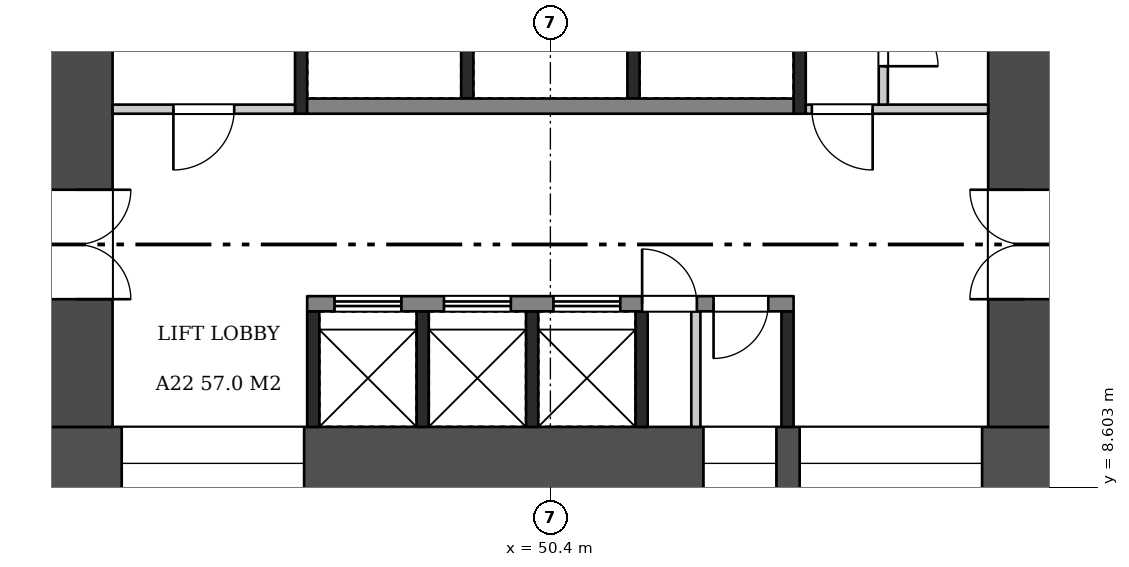
"""IFC4 building model, lengths in metres.
Left out: names, types, materials, properties, quantities, classifications, styles, units other than length and angle.
Written with IfcOpenShell. Run it as: python <this file> out.ifc"""

import sys

from ifc_helpers import new_model, si_unit, direction, frame, frame_2d, origin, place, context, subcontext, project, spatial, rectangle, extrude, element, fill, save


model = new_model("IFC4")
c1 = context("Model", 3, precision=1e-05, world=origin(), true_north=direction((0.0, 1.0)))
c2 = subcontext(c1, "Body", "Model", "MODEL_VIEW")
j1 = project(units=[si_unit("LENGTHUNIT", "METRE"), si_unit("PLANEANGLEUNIT", "RADIAN")], contexts=[c1])
p1 = place(None, origin())
s1 = spatial("IfcSite", under=j1, at=p1, CompositionType="ELEMENT")
p2 = place(p1, origin())
s2 = spatial("IfcBuilding", under=s1, at=p2, CompositionType="ELEMENT")
p3 = place(p2, frame((0.0, 0.0, 91.7)))
s3 = spatial("IfcBuildingStorey", under=s2, at=p3, CompositionType="ELEMENT", Elevation=91.7)
p4 = place(p3, frame((42.0, 9.0, 0.0), z_axis=(0.0, 0.0, 1.0), x_axis=(1.0, 0.0, 0.0)))
e1 = element("IfcWall", 1, at=p4, inside=s3, PredefinedType="SHEAR", context=c2, shape_type="SweptSolid", body=[
    extrude(rectangle(XDim=16.8, YDim=1.2, at=frame_2d((8.4, 0.0))), origin(), (0.0, 0.0, 1.0), 3.22),
])
p5 = place(p4, frame((1.35, 0.0, 0.6)))
e2 = element("IfcOpeningElement", 2, at=p5, cuts=e1, PredefinedType="OPENING", context=c2, shape_type="SweptSolid", body=[
    extrude(rectangle(XDim=3.0, YDim=2.1, at=frame_2d((1.5, 1.05))), frame((0.0, 0.61, 0.0), z_axis=(0.0, -1.0, 0.0), x_axis=(1.0, 0.0, 0.0)), (0.0, 0.0, 1.0), 1.22),
])
p6 = place(p4, frame((10.917, 0.0, 1.6)))
e3 = element("IfcOpeningElement", 3, at=p6, cuts=e1, PredefinedType="OPENING", context=c2, shape_type="SweptSolid", body=[
    extrude(rectangle(XDim=1.2, YDim=1.2, at=frame_2d((0.6, 0.6))), frame((0.0, 0.61, 0.0), z_axis=(0.0, -1.0, 0.0), x_axis=(1.0, 0.0, 0.0)), (0.0, 0.0, 1.0), 1.22),
])
p7 = place(p4, frame((12.5, 0.0, 0.6)))
e4 = element("IfcOpeningElement", 4, at=p7, cuts=e1, PredefinedType="OPENING", context=c2, shape_type="SweptSolid", body=[
    extrude(rectangle(XDim=3.0, YDim=2.1, at=frame_2d((1.5, 1.05))), frame((0.0, 0.61, 0.0), z_axis=(0.0, -1.0, 0.0), x_axis=(1.0, 0.0, 0.0)), (0.0, 0.0, 1.0), 1.22),
])
p8 = place(p3, frame((42.6, 9.6, 0.0), z_axis=(0.0, 0.0, 1.0), x_axis=(0.0, 1.0, 0.0)))
e5 = element("IfcWall", 5, at=p8, inside=s3, PredefinedType="SHEAR", context=c2, shape_type="SweptSolid", body=[
    extrude(rectangle(XDim=14.4, YDim=1.2, at=frame_2d((7.2, 0.0))), origin(), (0.0, 0.0, 1.0), 3.22),
])
p9 = place(p8, frame((2.1, 0.0, 0.0)))
e6 = element("IfcOpeningElement", 6, at=p9, cuts=e5, PredefinedType="OPENING", context=c2, shape_type="SweptSolid", body=[
    extrude(rectangle(XDim=1.8, YDim=2.1, at=frame_2d((0.9, 1.05))), frame((0.0, 0.61, 0.0), z_axis=(0.0, -1.0, 0.0), x_axis=(1.0, 0.0, 0.0)), (0.0, 0.0, 1.0), 1.22),
])
p10 = place(p3, frame((58.2, 9.6, 0.0), z_axis=(0.0, 0.0, 1.0), x_axis=(0.0, 1.0, 0.0)))
e7 = element("IfcWall", 7, at=p10, inside=s3, PredefinedType="SHEAR", context=c2, shape_type="SweptSolid", body=[
    extrude(rectangle(XDim=14.4, YDim=1.2, at=frame_2d((7.2, 0.0))), origin(), (0.0, 0.0, 1.0), 3.22),
])
p11 = place(p10, frame((2.1, 0.0, 0.0)))
e8 = element("IfcOpeningElement", 8, at=p11, cuts=e7, PredefinedType="OPENING", context=c2, shape_type="SweptSolid", body=[
    extrude(rectangle(XDim=1.8, YDim=2.1, at=frame_2d((0.9, 1.05))), frame((0.0, 0.61, 0.0), z_axis=(0.0, -1.0, 0.0), x_axis=(1.0, 0.0, 0.0)), (0.0, 0.0, 1.0), 1.22),
])
for number, where, z_axis, x_axis in (
    (9, (46.5, 9.6, 0.0), (0.0, 0.0, 1.0), (0.0, 1.0, 0.0)),
    (10, (48.3, 9.6, 0.0), (0.0, 0.0, 1.0), (0.0, 1.0, 0.0)),
    (11, (50.1, 9.6, 0.0), (0.0, 0.0, 1.0), (0.0, 1.0, 0.0)),
    (12, (51.9, 9.6, 0.0), (0.0, 0.0, 1.0), (0.0, 1.0, 0.0)),
    (13, (54.3, 9.6, 0.0), (0.0, 0.0, 1.0), (0.0, 1.0, 0.0)),
):
    element("IfcWall", number, at=place(p3, frame(where, z_axis=z_axis, x_axis=x_axis)), inside=s3, PredefinedType="SHEAR", context=c2, shape_type="SweptSolid", body=[
        extrude(rectangle(XDim=1.9, YDim=0.2, at=frame_2d((0.95, 0.0))), origin(), (0.0, 0.0, 1.0), 3.22),
    ])
p12 = place(p3, frame((52.792, 9.6, 0.0), z_axis=(0.0, 0.0, 1.0), x_axis=(0.0, 1.0, 0.0)))
e14 = element("IfcWall", 14, at=p12, inside=s3, PredefinedType="PARTITIONING", context=c2, shape_type="SweptSolid", body=[
    extrude(rectangle(XDim=1.9, YDim=0.15, at=frame_2d((0.95, 0.0))), origin(), (0.0, 0.0, 1.0), 3.22),
])
p13 = place(p3, frame((46.4, 11.625, 0.0), z_axis=(0.0, 0.0, 1.0), x_axis=(1.0, 0.0, 0.0)))
e15 = element("IfcWall", 15, at=p13, inside=s3, PredefinedType="SHEAR", context=c2, shape_type="SweptSolid", body=[
    extrude(rectangle(XDim=8.0, YDim=0.25, at=frame_2d((4.0, 0.0))), origin(), (0.0, 0.0, 1.0), 3.22),
])
p14 = place(p13, frame((0.45, 0.0, 0.0)))
e16 = element("IfcOpeningElement", 16, at=p14, cuts=e15, PredefinedType="OPENING", context=c2, shape_type="SweptSolid", body=[
    extrude(rectangle(XDim=1.1, YDim=2.1, at=frame_2d((0.55, 1.05))), frame((0.0, 0.135, 0.0), z_axis=(0.0, -1.0, 0.0), x_axis=(1.0, 0.0, 0.0)), (0.0, 0.0, 1.0), 0.27),
])
p15 = place(p13, frame((2.25, 0.0, 0.0)))
e17 = element("IfcOpeningElement", 17, at=p15, cuts=e15, PredefinedType="OPENING", context=c2, shape_type="SweptSolid", body=[
    extrude(rectangle(XDim=1.1, YDim=2.1, at=frame_2d((0.55, 1.05))), frame((0.0, 0.135, 0.0), z_axis=(0.0, -1.0, 0.0), x_axis=(1.0, 0.0, 0.0)), (0.0, 0.0, 1.0), 0.27),
])
p16 = place(p13, frame((4.05, 0.0, 0.0)))
e18 = element("IfcOpeningElement", 18, at=p16, cuts=e15, PredefinedType="OPENING", context=c2, shape_type="SweptSolid", body=[
    extrude(rectangle(XDim=1.1, YDim=2.1, at=frame_2d((0.55, 1.05))), frame((0.0, 0.135, 0.0), z_axis=(0.0, -1.0, 0.0), x_axis=(1.0, 0.0, 0.0)), (0.0, 0.0, 1.0), 0.27),
])
p17 = place(p13, frame((5.509, 0.0, 0.0)))
e19 = element("IfcOpeningElement", 19, at=p17, cuts=e15, PredefinedType="OPENING", context=c2, shape_type="SweptSolid", body=[
    extrude(rectangle(XDim=0.9, YDim=2.1, at=frame_2d((0.45, 1.05))), frame((0.0, 0.135, 0.0), z_axis=(0.0, -1.0, 0.0), x_axis=(1.0, 0.0, 0.0)), (0.0, 0.0, 1.0), 0.27),
])
p18 = place(p13, frame((6.684, 0.0, 0.0)))
e20 = element("IfcOpeningElement", 20, at=p18, cuts=e15, PredefinedType="OPENING", context=c2, shape_type="SweptSolid", body=[
    extrude(rectangle(XDim=0.9, YDim=2.1, at=frame_2d((0.45, 1.05))), frame((0.0, 0.135, 0.0), z_axis=(0.0, -1.0, 0.0), x_axis=(1.0, 0.0, 0.0)), (0.0, 0.0, 1.0), 0.27),
])
for number, where, z_axis, x_axis in (
    (21, (49.033, 15.0, 0.0), (0.0, 0.0, 1.0), (0.0, 1.0, 0.0)),
    (22, (51.767, 15.0, 0.0), (0.0, 0.0, 1.0), (0.0, 1.0, 0.0)),
):
    element("IfcWall", number, at=place(p3, frame(where, z_axis=z_axis, x_axis=x_axis)), inside=s3, PredefinedType="SHEAR", context=c2, shape_type="SweptSolid", body=[
        extrude(rectangle(XDim=1.9, YDim=0.2, at=frame_2d((0.95, 0.0))), origin(), (0.0, 0.0, 1.0), 3.22),
    ])
p19 = place(p3, frame((46.4, 14.875, 0.0), z_axis=(0.0, 0.0, 1.0), x_axis=(1.0, 0.0, 0.0)))
e23 = element("IfcWall", 23, at=p19, inside=s3, PredefinedType="SHEAR", context=c2, shape_type="SweptSolid", body=[
    extrude(rectangle(XDim=8.0, YDim=0.25, at=frame_2d((4.0, 0.0))), origin(), (0.0, 0.0, 1.0), 3.22),
])
p20 = place(p3, frame((46.3, 14.75, 0.0), z_axis=(0.0, 0.0, 1.0), x_axis=(0.0, 1.0, 0.0)))
e24 = element("IfcWall", 24, at=p20, inside=s3, PredefinedType="SHEAR", context=c2, shape_type="SweptSolid", body=[
    extrude(rectangle(XDim=2.4, YDim=0.2, at=frame_2d((1.2, 0.0))), origin(), (0.0, 0.0, 1.0), 3.22),
])
p21 = place(p3, frame((43.2, 14.825, 0.0), z_axis=(0.0, 0.0, 1.0), x_axis=(1.0, 0.0, 0.0)))
e25 = element("IfcWall", 25, at=p21, inside=s3, PredefinedType="PARTITIONING", context=c2, shape_type="SweptSolid", body=[
    extrude(rectangle(XDim=3.0, YDim=0.15, at=frame_2d((1.5, 0.0))), origin(), (0.0, 0.0, 1.0), 3.22),
])
p22 = place(p21, frame((1.0, 0.0, 0.0)))
e26 = element("IfcOpeningElement", 26, at=p22, cuts=e25, PredefinedType="OPENING", context=c2, shape_type="SweptSolid", body=[
    extrude(rectangle(XDim=1.0, YDim=2.1, at=frame_2d((0.5, 1.05))), frame((0.0, 0.085, 0.0), z_axis=(0.0, -1.0, 0.0), x_axis=(1.0, 0.0, 0.0)), (0.0, 0.0, 1.0), 0.17),
])
p23 = place(p3, frame((54.5, 14.75, 0.0), z_axis=(0.0, 0.0, 1.0), x_axis=(0.0, 1.0, 0.0)))
e27 = element("IfcWall", 27, at=p23, inside=s3, PredefinedType="SHEAR", context=c2, shape_type="SweptSolid", body=[
    extrude(rectangle(XDim=9.25, YDim=0.2, at=frame_2d((4.625, 0.0))), origin(), (0.0, 0.0, 1.0), 3.22),
])
p24 = place(p3, frame((54.6, 14.825, 0.0), z_axis=(0.0, 0.0, 1.0), x_axis=(1.0, 0.0, 0.0)))
e28 = element("IfcWall", 28, at=p24, inside=s3, PredefinedType="PARTITIONING", context=c2, shape_type="SweptSolid", body=[
    extrude(rectangle(XDim=3.0, YDim=0.15, at=frame_2d((1.5, 0.0))), origin(), (0.0, 0.0, 1.0), 3.22),
])
p25 = place(p24, frame((0.1, 0.0, 0.0)))
e29 = element("IfcOpeningElement", 29, at=p25, cuts=e28, PredefinedType="OPENING", context=c2, shape_type="SweptSolid", body=[
    extrude(rectangle(XDim=1.0, YDim=2.1, at=frame_2d((0.5, 1.05))), frame((0.0, 0.085, 0.0), z_axis=(0.0, -1.0, 0.0), x_axis=(1.0, 0.0, 0.0)), (0.0, 0.0, 1.0), 0.17),
])
p26 = place(p3, frame((55.875, 14.9, 0.0), z_axis=(0.0, 0.0, 1.0), x_axis=(0.0, 1.0, 0.0)))
e30 = element("IfcWall", 30, at=p26, inside=s3, PredefinedType="PARTITIONING", context=c2, shape_type="SweptSolid", body=[
    extrude(rectangle(XDim=9.1, YDim=0.15, at=frame_2d((4.55, 0.0))), origin(), (0.0, 0.0, 1.0), 3.22),
])
p27 = place(p26, frame((0.631, 0.0, 0.0)))
e31 = element("IfcOpeningElement", 31, at=p27, cuts=e30, PredefinedType="OPENING", context=c2, shape_type="SweptSolid", body=[
    extrude(rectangle(XDim=0.9, YDim=2.1, at=frame_2d((0.45, 1.05))), frame((0.0, 0.085, 0.0), z_axis=(0.0, -1.0, 0.0), x_axis=(1.0, 0.0, 0.0)), (0.0, 0.0, 1.0), 0.17),
])
p28 = place(p26, frame((2.944, 0.0, 0.0)))
e32 = element("IfcOpeningElement", 32, at=p28, cuts=e30, PredefinedType="OPENING", context=c2, shape_type="SweptSolid", body=[
    extrude(rectangle(XDim=0.9, YDim=2.1, at=frame_2d((0.45, 1.05))), frame((0.0, 0.085, 0.0), z_axis=(0.0, -1.0, 0.0), x_axis=(1.0, 0.0, 0.0)), (0.0, 0.0, 1.0), 0.17),
])
p29 = place(p26, frame((5.256, 0.0, 0.0)))
e33 = element("IfcOpeningElement", 33, at=p29, cuts=e30, PredefinedType="OPENING", context=c2, shape_type="SweptSolid", body=[
    extrude(rectangle(XDim=0.9, YDim=2.1, at=frame_2d((0.45, 1.05))), frame((0.0, 0.085, 0.0), z_axis=(0.0, -1.0, 0.0), x_axis=(1.0, 0.0, 0.0)), (0.0, 0.0, 1.0), 0.17),
])
p30 = place(p26, frame((7.569, 0.0, 0.0)))
e34 = element("IfcOpeningElement", 34, at=p30, cuts=e30, PredefinedType="OPENING", context=c2, shape_type="SweptSolid", body=[
    extrude(rectangle(XDim=0.9, YDim=2.1, at=frame_2d((0.45, 1.05))), frame((0.0, 0.085, 0.0), z_axis=(0.0, -1.0, 0.0), x_axis=(1.0, 0.0, 0.0)), (0.0, 0.0, 1.0), 0.17),
])
p31 = place(p9, frame((1.8, 0.0, 0.0), z_axis=(0.0, 0.0, 1.0), x_axis=(-1.0, 0.0, 0.0)))
e35 = element("IfcDoor", 35, at=p31, inside=s3, OperationType="DOUBLE_DOOR_SINGLE_SWING", PredefinedType="DOOR", context=c2, shape_type="SweptSolid", body=[
    extrude(rectangle(XDim=1.8, YDim=2.1, at=frame_2d((0.9, 1.05))), frame((0.0, 0.025, 0.0), z_axis=(0.0, -1.0, 0.0), x_axis=(1.0, 0.0, 0.0)), (0.0, 0.0, 1.0), 0.05),
])
fill(e6, e35)
p32 = place(p11, origin())
e36 = element("IfcDoor", 36, at=p32, inside=s3, OperationType="DOUBLE_DOOR_SINGLE_SWING", PredefinedType="DOOR", context=c2, shape_type="SweptSolid", body=[
    extrude(rectangle(XDim=1.8, YDim=2.1, at=frame_2d((0.9, 1.05))), frame((0.0, 0.025, 0.0), z_axis=(0.0, -1.0, 0.0), x_axis=(1.0, 0.0, 0.0)), (0.0, 0.0, 1.0), 0.05),
])
fill(e8, e36)
p33 = place(p14, origin())
e37 = element("IfcDoor", 37, at=p33, inside=s3, OperationType="DOUBLE_DOOR_SLIDING", PredefinedType="DOOR", context=c2, shape_type="SweptSolid", body=[
    extrude(rectangle(XDim=1.1, YDim=2.1, at=frame_2d((0.55, 1.05))), frame((0.0, 0.025, 0.0), z_axis=(0.0, -1.0, 0.0), x_axis=(1.0, 0.0, 0.0)), (0.0, 0.0, 1.0), 0.05),
])
fill(e16, e37)
p34 = place(p15, origin())
e38 = element("IfcDoor", 38, at=p34, inside=s3, OperationType="DOUBLE_DOOR_SLIDING", PredefinedType="DOOR", context=c2, shape_type="SweptSolid", body=[
    extrude(rectangle(XDim=1.1, YDim=2.1, at=frame_2d((0.55, 1.05))), frame((0.0, 0.025, 0.0), z_axis=(0.0, -1.0, 0.0), x_axis=(1.0, 0.0, 0.0)), (0.0, 0.0, 1.0), 0.05),
])
fill(e17, e38)
p35 = place(p16, origin())
e39 = element("IfcDoor", 39, at=p35, inside=s3, OperationType="DOUBLE_DOOR_SLIDING", PredefinedType="DOOR", context=c2, shape_type="SweptSolid", body=[
    extrude(rectangle(XDim=1.1, YDim=2.1, at=frame_2d((0.55, 1.05))), frame((0.0, 0.025, 0.0), z_axis=(0.0, -1.0, 0.0), x_axis=(1.0, 0.0, 0.0)), (0.0, 0.0, 1.0), 0.05),
])
fill(e18, e39)
p36 = place(p17, origin())
e40 = element("IfcDoor", 40, at=p36, inside=s3, OperationType="SINGLE_SWING_LEFT", PredefinedType="DOOR", context=c2, shape_type="SweptSolid", body=[
    extrude(rectangle(XDim=0.9, YDim=2.1, at=frame_2d((0.45, 1.05))), frame((0.0, 0.025, 0.0), z_axis=(0.0, -1.0, 0.0), x_axis=(1.0, 0.0, 0.0)), (0.0, 0.0, 1.0), 0.05),
])
fill(e19, e40)
p37 = place(p18, frame((0.9, 0.0, 0.0), z_axis=(0.0, 0.0, 1.0), x_axis=(-1.0, 0.0, 0.0)))
e41 = element("IfcDoor", 41, at=p37, inside=s3, OperationType="SINGLE_SWING_RIGHT", PredefinedType="DOOR", context=c2, shape_type="SweptSolid", body=[
    extrude(rectangle(XDim=0.9, YDim=2.1, at=frame_2d((0.45, 1.05))), frame((0.0, 0.025, 0.0), z_axis=(0.0, -1.0, 0.0), x_axis=(1.0, 0.0, 0.0)), (0.0, 0.0, 1.0), 0.05),
])
fill(e20, e41)
p38 = place(p22, frame((1.0, 0.0, 0.0), z_axis=(0.0, 0.0, 1.0), x_axis=(-1.0, 0.0, 0.0)))
e42 = element("IfcDoor", 42, at=p38, inside=s3, OperationType="SINGLE_SWING_RIGHT", PredefinedType="DOOR", context=c2, shape_type="SweptSolid", body=[
    extrude(rectangle(XDim=1.0, YDim=2.1, at=frame_2d((0.5, 1.05))), frame((0.0, 0.025, 0.0), z_axis=(0.0, -1.0, 0.0), x_axis=(1.0, 0.0, 0.0)), (0.0, 0.0, 1.0), 0.05),
])
fill(e26, e42)
p39 = place(p25, frame((1.0, 0.0, 0.0), z_axis=(0.0, 0.0, 1.0), x_axis=(-1.0, 0.0, 0.0)))
e43 = element("IfcDoor", 43, at=p39, inside=s3, OperationType="SINGLE_SWING_LEFT", PredefinedType="DOOR", context=c2, shape_type="SweptSolid", body=[
    extrude(rectangle(XDim=1.0, YDim=2.1, at=frame_2d((0.5, 1.05))), frame((0.0, 0.025, 0.0), z_axis=(0.0, -1.0, 0.0), x_axis=(1.0, 0.0, 0.0)), (0.0, 0.0, 1.0), 0.05),
])
fill(e29, e43)
p40 = place(p27, frame((0.9, 0.0, 0.0), z_axis=(0.0, 0.0, 1.0), x_axis=(-1.0, 0.0, 0.0)))
e44 = element("IfcDoor", 44, at=p40, inside=s3, OperationType="SINGLE_SWING_RIGHT", PredefinedType="DOOR", context=c2, shape_type="SweptSolid", body=[
    extrude(rectangle(XDim=0.9, YDim=2.1, at=frame_2d((0.45, 1.05))), frame((0.0, 0.025, 0.0), z_axis=(0.0, -1.0, 0.0), x_axis=(1.0, 0.0, 0.0)), (0.0, 0.0, 1.0), 0.05),
])
fill(e31, e44)
p41 = place(p5, origin())
e45 = element("IfcWindow", 45, at=p41, inside=s3, PartitioningType="SINGLE_PANEL", PredefinedType="WINDOW", context=c2, shape_type="SweptSolid", body=[
    extrude(rectangle(XDim=3.0, YDim=2.1, at=frame_2d((1.5, 1.05))), frame((0.0, 0.03, 0.0), z_axis=(0.0, -1.0, 0.0), x_axis=(1.0, 0.0, 0.0)), (0.0, 0.0, 1.0), 0.06),
])
fill(e2, e45)
p42 = place(p6, origin())
e46 = element("IfcWindow", 46, at=p42, inside=s3, PartitioningType="SINGLE_PANEL", PredefinedType="WINDOW", context=c2, shape_type="SweptSolid", body=[
    extrude(rectangle(XDim=1.2, YDim=1.2, at=frame_2d((0.6, 0.6))), frame((0.0, 0.03, 0.0), z_axis=(0.0, -1.0, 0.0), x_axis=(1.0, 0.0, 0.0)), (0.0, 0.0, 1.0), 0.06),
])
fill(e3, e46)
p43 = place(p7, origin())
e47 = element("IfcWindow", 47, at=p43, inside=s3, PartitioningType="SINGLE_PANEL", PredefinedType="WINDOW", context=c2, shape_type="SweptSolid", body=[
    extrude(rectangle(XDim=3.0, YDim=2.1, at=frame_2d((1.5, 1.05))), frame((0.0, 0.03, 0.0), z_axis=(0.0, -1.0, 0.0), x_axis=(1.0, 0.0, 0.0)), (0.0, 0.0, 1.0), 0.06),
])
fill(e4, e47)
save(model, sys.argv[1])
